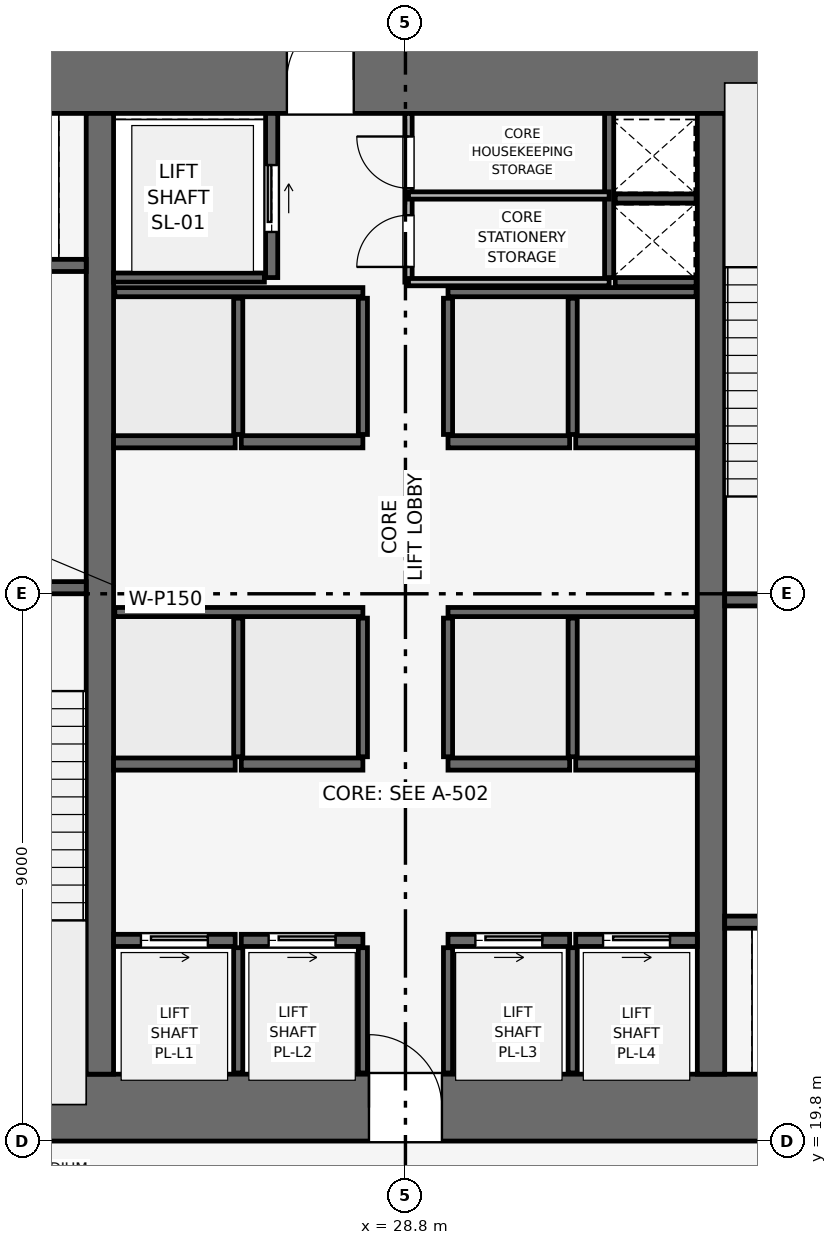
"""IFC4 building model, lengths in metres.
Left out: names, types, materials, properties, quantities, classifications, styles, units other than length and angle.
Written with IfcOpenShell. Run it as: python <this file> out.ifc"""

import sys

from ifc_helpers import new_model, si_unit, direction, frame, frame_2d, origin, place, context, subcontext, project, spatial, rectangle, extrude, element, fill, save


model = new_model("IFC4")
c1 = context("Model", 3, precision=1e-05, world=origin(), true_north=direction((0.0, 1.0)))
c2 = subcontext(c1, "Body", "Model", "MODEL_VIEW")
j1 = project(units=[si_unit("LENGTHUNIT", "METRE"), si_unit("PLANEANGLEUNIT", "RADIAN")], contexts=[c1])
p1 = place(None, origin())
s1 = spatial("IfcSite", under=j1, at=p1, CompositionType="ELEMENT")
p2 = place(p1, origin())
s2 = spatial("IfcBuilding", under=s1, at=p2, CompositionType="ELEMENT")
p3 = place(p2, frame((0.0, 0.0, 19.2)))
s3 = spatial("IfcBuildingStorey", under=s2, at=p3, CompositionType="ELEMENT", Elevation=19.2)
p4 = place(p3, frame((19.8, 20.35, 0.0), z_axis=(0.0, 0.0, 1.0), x_axis=(1.0, 0.0, 0.0)))
e1 = element("IfcWall", 1, at=p4, inside=s3, PredefinedType="SHEAR", context=c2, shape_type="SweptSolid", body=[
    extrude(rectangle(XDim=18.0, YDim=1.1, at=frame_2d((9.0, 0.0))), origin(), (0.0, 0.0, 1.0), 4.8),
])
p5 = place(p4, frame((8.4, 0.0, 0.0)))
e2 = element("IfcOpeningElement", 2, at=p5, cuts=e1, PredefinedType="OPENING", context=c2, shape_type="SweptSolid", body=[
    extrude(rectangle(XDim=1.2, YDim=2.2, at=frame_2d((0.6, 1.1))), frame((0.0, 0.56, 0.0), z_axis=(0.0, -1.0, 0.0), x_axis=(1.0, 0.0, 0.0)), (0.0, 0.0, 1.0), 1.12),
])
p6 = place(p3, frame((19.8, 37.25, 0.0), z_axis=(0.0, 0.0, 1.0), x_axis=(1.0, 0.0, 0.0)))
e3 = element("IfcWall", 3, at=p6, inside=s3, PredefinedType="SHEAR", context=c2, shape_type="SweptSolid", body=[
    extrude(rectangle(XDim=18.0, YDim=1.1, at=frame_2d((9.0, 0.0))), origin(), (0.0, 0.0, 1.0), 4.8),
])
p7 = place(p6, frame((7.05, 0.0, 0.0)))
e4 = element("IfcOpeningElement", 4, at=p7, cuts=e3, PredefinedType="OPENING", context=c2, shape_type="SweptSolid", body=[
    extrude(rectangle(XDim=1.1, YDim=2.15, at=frame_2d((0.55, 1.075))), frame((0.0, 0.56, 0.0), z_axis=(0.0, -1.0, 0.0), x_axis=(1.0, 0.0, 0.0)), (0.0, 0.0, 1.0), 1.12),
])
for number, where, z_axis, x_axis in (
    (5, (23.775, 20.9, 0.0), (0.0, 0.0, 1.0), (0.0, 1.0, 0.0)),
    (6, (33.825, 20.9, 0.0), (0.0, 0.0, 1.0), (0.0, 1.0, 0.0)),
):
    element("IfcWall", number, at=place(p3, frame(where, z_axis=z_axis, x_axis=x_axis)), inside=s3, PredefinedType="SHEAR", context=c2, shape_type="SweptSolid", body=[
        extrude(rectangle(XDim=15.8, YDim=0.45, at=frame_2d((7.9, 0.0))), origin(), (0.0, 0.0, 1.0), 4.8),
    ])
p8 = place(p3, frame((20.4, 28.9, 0.0), z_axis=(0.0, 0.0, 1.0), x_axis=(1.0, 0.0, 0.0)))
e7 = element("IfcWall", 7, at=p8, inside=s3, PredefinedType="SHEAR", context=c2, shape_type="SweptSolid", body=[
    extrude(rectangle(XDim=3.15, YDim=0.2, at=frame_2d((1.575, 0.0))), origin(), (0.0, 0.0, 1.0), 4.35),
])
p9 = place(p8, frame((0.8, 0.0, 0.0)))
e8 = element("IfcOpeningElement", 8, at=p9, cuts=e7, PredefinedType="OPENING", context=c2, shape_type="SweptSolid", body=[
    extrude(rectangle(XDim=1.0, YDim=2.1, at=frame_2d((0.5, 1.05))), frame((0.0, 0.11, 0.0), z_axis=(0.0, -1.0, 0.0), x_axis=(1.0, 0.0, 0.0)), (0.0, 0.0, 1.0), 0.22),
])
p10 = place(p3, frame((34.05, 28.7, 0.0), z_axis=(0.0, 0.0, 1.0), x_axis=(1.0, 0.0, 0.0)))
e9 = element("IfcWall", 9, at=p10, inside=s3, PredefinedType="SHEAR", context=c2, shape_type="SweptSolid", body=[
    extrude(rectangle(XDim=3.15, YDim=0.2, at=frame_2d((1.575, 0.0))), origin(), (0.0, 0.0, 1.0), 4.35),
])
p11 = place(p10, frame((0.8, 0.0, 0.0)))
e10 = element("IfcOpeningElement", 10, at=p11, cuts=e9, PredefinedType="OPENING", context=c2, shape_type="SweptSolid", body=[
    extrude(rectangle(XDim=1.0, YDim=2.1, at=frame_2d((0.5, 1.05))), frame((0.0, 0.11, 0.0), z_axis=(0.0, -1.0, 0.0), x_axis=(1.0, 0.0, 0.0)), (0.0, 0.0, 1.0), 0.22),
])
p12 = place(p3, frame((32.15, 34.0, 0.0), z_axis=(0.0, 0.0, 1.0), x_axis=(0.0, 1.0, 0.0)))
e11 = element("IfcWall", 11, at=p12, inside=s3, PredefinedType="SHEAR", context=c2, shape_type="SweptSolid", body=[
    extrude(rectangle(XDim=2.7, YDim=0.15, at=frame_2d((1.35, 0.0))), origin(), (0.0, 0.0, 1.0), 4.35),
])
for number, where, z_axis, x_axis in (
    (12, (32.25, 33.925, 0.0), (0.0, 0.0, 1.0), (1.0, 0.0, 0.0)),
    (13, (32.25, 35.3, 0.0), (0.0, 0.0, 1.0), (1.0, 0.0, 0.0)),
):
    element("IfcWall", number, at=place(p3, frame(where, z_axis=z_axis, x_axis=x_axis)), inside=s3, PredefinedType="SHEAR", context=c2, shape_type="SweptSolid", body=[
        extrude(rectangle(XDim=1.33, YDim=0.15, at=frame_2d((0.665, 0.0))), origin(), (0.0, 0.0, 1.0), 4.35),
    ])
p13 = place(p3, frame((20.5, 34.2, 0.0), z_axis=(0.0, 0.0, 1.0), x_axis=(1.0, 0.0, 0.0)))
e14 = element("IfcWall", 14, at=p13, inside=s3, PredefinedType="SHEAR", context=c2, shape_type="SweptSolid", body=[
    extrude(rectangle(XDim=3.05, YDim=0.2, at=frame_2d((1.525, 0.0))), origin(), (0.0, 0.0, 1.0), 4.35),
])
p14 = place(p13, frame((0.75, 0.0, 0.0)))
e15 = element("IfcOpeningElement", 15, at=p14, cuts=e14, PredefinedType="OPENING", context=c2, shape_type="SweptSolid", body=[
    extrude(rectangle(XDim=1.1, YDim=2.15, at=frame_2d((0.55, 1.075))), frame((0.0, 0.11, 0.0), z_axis=(0.0, -1.0, 0.0), x_axis=(1.0, 0.0, 0.0)), (0.0, 0.0, 1.0), 0.22),
])
p15 = place(p3, frame((34.05, 23.4, 0.0), z_axis=(0.0, 0.0, 1.0), x_axis=(1.0, 0.0, 0.0)))
e16 = element("IfcWall", 16, at=p15, inside=s3, PredefinedType="SHEAR", context=c2, shape_type="SweptSolid", body=[
    extrude(rectangle(XDim=3.05, YDim=0.2, at=frame_2d((1.525, 0.0))), origin(), (0.0, 0.0, 1.0), 4.35),
])
p16 = place(p15, frame((1.2, 0.0, 0.0)))
e17 = element("IfcOpeningElement", 17, at=p16, cuts=e16, PredefinedType="OPENING", context=c2, shape_type="SweptSolid", body=[
    extrude(rectangle(XDim=1.1, YDim=2.15, at=frame_2d((0.55, 1.075))), frame((0.0, 0.11, 0.0), z_axis=(0.0, -1.0, 0.0), x_axis=(1.0, 0.0, 0.0)), (0.0, 0.0, 1.0), 0.22),
])
p17 = place(p3, frame((26.6, 34.0, 0.0), z_axis=(0.0, 0.0, 1.0), x_axis=(0.0, 1.0, 0.0)))
e18 = element("IfcWall", 18, at=p17, inside=s3, PredefinedType="SHEAR", context=c2, shape_type="SweptSolid", body=[
    extrude(rectangle(XDim=2.7, YDim=0.2, at=frame_2d((1.35, 0.0))), origin(), (0.0, 0.0, 1.0), 4.35),
])
p18 = place(p17, frame((0.75, 0.0, 0.0)))
e19 = element("IfcOpeningElement", 19, at=p18, cuts=e18, PredefinedType="OPENING", context=c2, shape_type="SweptSolid", body=[
    extrude(rectangle(XDim=1.1, YDim=2.15, at=frame_2d((0.55, 1.075))), frame((0.0, 0.11, 0.0), z_axis=(0.0, -1.0, 0.0), x_axis=(1.0, 0.0, 0.0)), (0.0, 0.0, 1.0), 0.22),
])
p19 = place(p3, frame((24.0, 34.0, 0.0), z_axis=(0.0, 0.0, 1.0), x_axis=(1.0, 0.0, 0.0)))
e20 = element("IfcWall", 20, at=p19, inside=s3, PredefinedType="SHEAR", context=c2, shape_type="SweptSolid", body=[
    extrude(rectangle(XDim=2.48, YDim=0.15, at=frame_2d((1.24, 0.0))), origin(), (0.0, 0.0, 1.0), 4.35),
])
p20 = place(p3, frame((24.0, 23.1, 0.0), z_axis=(0.0, 0.0, 1.0), x_axis=(1.0, 0.0, 0.0)))
e21 = element("IfcWall", 21, at=p20, inside=s3, PredefinedType="SHEAR", context=c2, shape_type="SweptSolid", body=[
    extrude(rectangle(XDim=2.0, YDim=0.2, at=frame_2d((1.0, 0.0))), origin(), (0.0, 0.0, 1.0), 4.35),
])
p21 = place(p20, frame((0.45, 0.0, 0.0)))
e22 = element("IfcOpeningElement", 22, at=p21, cuts=e21, PredefinedType="OPENING", context=c2, shape_type="SweptSolid", body=[
    extrude(rectangle(XDim=1.1, YDim=2.15, at=frame_2d((0.55, 1.075))), frame((0.0, 0.11, 0.0), z_axis=(0.0, -1.0, 0.0), x_axis=(1.0, 0.0, 0.0)), (0.0, 0.0, 1.0), 0.22),
])
p22 = place(p3, frame((26.1, 23.1, 0.0), z_axis=(0.0, 0.0, 1.0), x_axis=(1.0, 0.0, 0.0)))
e23 = element("IfcWall", 23, at=p22, inside=s3, PredefinedType="SHEAR", context=c2, shape_type="SweptSolid", body=[
    extrude(rectangle(XDim=2.0, YDim=0.2, at=frame_2d((1.0, 0.0))), origin(), (0.0, 0.0, 1.0), 4.35),
])
p23 = place(p22, frame((0.45, 0.0, 0.0)))
e24 = element("IfcOpeningElement", 24, at=p23, cuts=e23, PredefinedType="OPENING", context=c2, shape_type="SweptSolid", body=[
    extrude(rectangle(XDim=1.1, YDim=2.15, at=frame_2d((0.55, 1.075))), frame((0.0, 0.11, 0.0), z_axis=(0.0, -1.0, 0.0), x_axis=(1.0, 0.0, 0.0)), (0.0, 0.0, 1.0), 0.22),
])
p24 = place(p3, frame((29.5, 23.1, 0.0), z_axis=(0.0, 0.0, 1.0), x_axis=(1.0, 0.0, 0.0)))
e25 = element("IfcWall", 25, at=p24, inside=s3, PredefinedType="SHEAR", context=c2, shape_type="SweptSolid", body=[
    extrude(rectangle(XDim=2.0, YDim=0.2, at=frame_2d((1.0, 0.0))), origin(), (0.0, 0.0, 1.0), 4.35),
])
p25 = place(p24, frame((0.45, 0.0, 0.0)))
e26 = element("IfcOpeningElement", 26, at=p25, cuts=e25, PredefinedType="OPENING", context=c2, shape_type="SweptSolid", body=[
    extrude(rectangle(XDim=1.1, YDim=2.15, at=frame_2d((0.55, 1.075))), frame((0.0, 0.11, 0.0), z_axis=(0.0, -1.0, 0.0), x_axis=(1.0, 0.0, 0.0)), (0.0, 0.0, 1.0), 0.22),
])
p26 = place(p3, frame((31.6, 23.1, 0.0), z_axis=(0.0, 0.0, 1.0), x_axis=(1.0, 0.0, 0.0)))
e27 = element("IfcWall", 27, at=p26, inside=s3, PredefinedType="SHEAR", context=c2, shape_type="SweptSolid", body=[
    extrude(rectangle(XDim=2.0, YDim=0.2, at=frame_2d((1.0, 0.0))), origin(), (0.0, 0.0, 1.0), 4.35),
])
p27 = place(p26, frame((0.45, 0.0, 0.0)))
e28 = element("IfcOpeningElement", 28, at=p27, cuts=e27, PredefinedType="OPENING", context=c2, shape_type="SweptSolid", body=[
    extrude(rectangle(XDim=1.1, YDim=2.15, at=frame_2d((0.55, 1.075))), frame((0.0, 0.11, 0.0), z_axis=(0.0, -1.0, 0.0), x_axis=(1.0, 0.0, 0.0)), (0.0, 0.0, 1.0), 0.22),
])
for number, where, z_axis, x_axis in (
    (29, (24.0, 26.0, 0.0), (0.0, 0.0, 1.0), (1.0, 0.0, 0.0)),
    (30, (26.1, 26.0, 0.0), (0.0, 0.0, 1.0), (1.0, 0.0, 0.0)),
    (31, (29.5, 26.0, 0.0), (0.0, 0.0, 1.0), (1.0, 0.0, 0.0)),
    (32, (31.6, 26.0, 0.0), (0.0, 0.0, 1.0), (1.0, 0.0, 0.0)),
    (33, (24.0, 31.3, 0.0), (0.0, 0.0, 1.0), (1.0, 0.0, 0.0)),
    (34, (26.1, 31.3, 0.0), (0.0, 0.0, 1.0), (1.0, 0.0, 0.0)),
    (35, (29.5, 31.3, 0.0), (0.0, 0.0, 1.0), (1.0, 0.0, 0.0)),
    (36, (31.6, 31.3, 0.0), (0.0, 0.0, 1.0), (1.0, 0.0, 0.0)),
):
    element("IfcWall", number, at=place(p3, frame(where, z_axis=z_axis, x_axis=x_axis)), inside=s3, PredefinedType="SHEAR", context=c2, shape_type="SweptSolid", body=[
        extrude(rectangle(XDim=2.0, YDim=0.2, at=frame_2d((1.0, 0.0))), origin(), (0.0, 0.0, 1.0), 4.35),
    ])
for number, where, z_axis, x_axis in (
    (37, (26.05, 20.92, 0.0), (0.0, 0.0, 1.0), (0.0, 1.0, 0.0)),
    (38, (28.1, 20.92, 0.0), (0.0, 0.0, 1.0), (0.0, 1.0, 0.0)),
    (39, (29.5, 20.92, 0.0), (0.0, 0.0, 1.0), (0.0, 1.0, 0.0)),
    (40, (31.55, 20.92, 0.0), (0.0, 0.0, 1.0), (0.0, 1.0, 0.0)),
):
    element("IfcWall", number, at=place(p3, frame(where, z_axis=z_axis, x_axis=x_axis)), inside=s3, PredefinedType="SHEAR", context=c2, shape_type="SweptSolid", body=[
        extrude(rectangle(XDim=2.06, YDim=0.15, at=frame_2d((1.03, 0.0))), origin(), (0.0, 0.0, 1.0), 4.35),
    ])
for number, where, z_axis, x_axis in (
    (41, (24.02, 28.5, 0.0), (0.0, 0.0, 1.0), (1.0, 0.0, 0.0)),
    (42, (29.5, 28.5, 0.0), (0.0, 0.0, 1.0), (1.0, 0.0, 0.0)),
):
    element("IfcWall", number, at=place(p3, frame(where, z_axis=z_axis, x_axis=x_axis)), inside=s3, PredefinedType="SHEAR", context=c2, shape_type="SweptSolid", body=[
        extrude(rectangle(XDim=4.08, YDim=0.15, at=frame_2d((2.04, 0.0))), origin(), (0.0, 0.0, 1.0), 4.35),
    ])
for number, where, z_axis, x_axis in (
    (43, (26.05, 26.12, 0.0), (0.0, 0.0, 1.0), (0.0, 1.0, 0.0)),
    (44, (28.1, 26.12, 0.0), (0.0, 0.0, 1.0), (0.0, 1.0, 0.0)),
    (45, (29.5, 26.12, 0.0), (0.0, 0.0, 1.0), (0.0, 1.0, 0.0)),
    (46, (31.55, 26.12, 0.0), (0.0, 0.0, 1.0), (0.0, 1.0, 0.0)),
):
    element("IfcWall", number, at=place(p3, frame(where, z_axis=z_axis, x_axis=x_axis)), inside=s3, PredefinedType="SHEAR", context=c2, shape_type="SweptSolid", body=[
        extrude(rectangle(XDim=2.28, YDim=0.15, at=frame_2d((1.14, 0.0))), origin(), (0.0, 0.0, 1.0), 4.35),
    ])
for number, where, z_axis, x_axis in (
    (47, (24.02, 33.76, 0.0), (0.0, 0.0, 1.0), (1.0, 0.0, 0.0)),
    (48, (29.5, 33.76, 0.0), (0.0, 0.0, 1.0), (1.0, 0.0, 0.0)),
):
    element("IfcWall", number, at=place(p3, frame(where, z_axis=z_axis, x_axis=x_axis)), inside=s3, PredefinedType="SHEAR", context=c2, shape_type="SweptSolid", body=[
        extrude(rectangle(XDim=4.08, YDim=0.15, at=frame_2d((2.04, 0.0))), origin(), (0.0, 0.0, 1.0), 4.35),
    ])
for number, where, z_axis, x_axis in (
    (49, (26.05, 31.42, 0.0), (0.0, 0.0, 1.0), (0.0, 1.0, 0.0)),
    (50, (28.1, 31.42, 0.0), (0.0, 0.0, 1.0), (0.0, 1.0, 0.0)),
    (51, (29.5, 31.42, 0.0), (0.0, 0.0, 1.0), (0.0, 1.0, 0.0)),
    (52, (31.55, 31.42, 0.0), (0.0, 0.0, 1.0), (0.0, 1.0, 0.0)),
):
    element("IfcWall", number, at=place(p3, frame(where, z_axis=z_axis, x_axis=x_axis)), inside=s3, PredefinedType="SHEAR", context=c2, shape_type="SweptSolid", body=[
        extrude(rectangle(XDim=2.24, YDim=0.15, at=frame_2d((1.12, 0.0))), origin(), (0.0, 0.0, 1.0), 4.35),
    ])
p28 = place(p3, frame((28.85, 33.925, 0.0), z_axis=(0.0, 0.0, 1.0), x_axis=(0.0, 1.0, 0.0)))
e53 = element("IfcWall", 53, at=p28, inside=s3, PredefinedType="PARTITIONING", context=c2, shape_type="SweptSolid", body=[
    extrude(rectangle(XDim=2.775, YDim=0.12, at=frame_2d((1.387, 0.0))), origin(), (0.0, 0.0, 1.0), 4.35),
])
p29 = place(p28, frame((0.25, 0.0, 0.0)))
e54 = element("IfcOpeningElement", 54, at=p29, cuts=e53, PredefinedType="OPENING", context=c2, shape_type="SweptSolid", body=[
    extrude(rectangle(XDim=0.85, YDim=2.1, at=frame_2d((0.425, 1.05))), frame((0.0, 0.07, 0.0), z_axis=(0.0, -1.0, 0.0), x_axis=(1.0, 0.0, 0.0)), (0.0, 0.0, 1.0), 0.14),
])
p30 = place(p28, frame((1.545, 0.0, 0.0)))
e55 = element("IfcOpeningElement", 55, at=p30, cuts=e53, PredefinedType="OPENING", context=c2, shape_type="SweptSolid", body=[
    extrude(rectangle(XDim=0.85, YDim=2.1, at=frame_2d((0.425, 1.05))), frame((0.0, 0.07, 0.0), z_axis=(0.0, -1.0, 0.0), x_axis=(1.0, 0.0, 0.0)), (0.0, 0.0, 1.0), 0.14),
])
for number, where, z_axis, x_axis in (
    (56, (28.85, 35.35, 0.0), (0.0, 0.0, 1.0), (1.0, 0.0, 0.0)),
    (57, (28.85, 33.925, 0.0), (0.0, 0.0, 1.0), (1.0, 0.0, 0.0)),
):
    element("IfcWall", number, at=place(p3, frame(where, z_axis=z_axis, x_axis=x_axis)), inside=s3, PredefinedType="PARTITIONING", context=c2, shape_type="SweptSolid", body=[
        extrude(rectangle(XDim=3.3, YDim=0.12, at=frame_2d((1.65, 0.0))), origin(), (0.0, 0.0, 1.0), 4.35),
    ])
p31 = place(p18, origin())
e58 = element("IfcDoor", 58, at=p31, inside=s3, OperationType="SLIDING_TO_RIGHT", PredefinedType="DOOR", context=c2, shape_type="SweptSolid", body=[
    extrude(rectangle(XDim=1.1, YDim=2.15, at=frame_2d((0.55, 1.075))), frame((0.0, 0.025, 0.0), z_axis=(0.0, -1.0, 0.0), x_axis=(1.0, 0.0, 0.0)), (0.0, 0.0, 1.0), 0.05),
])
fill(e19, e58)
p32 = place(p21, origin())
e59 = element("IfcDoor", 59, at=p32, inside=s3, OperationType="SLIDING_TO_RIGHT", PredefinedType="DOOR", context=c2, shape_type="SweptSolid", body=[
    extrude(rectangle(XDim=1.1, YDim=2.15, at=frame_2d((0.55, 1.075))), frame((0.0, 0.025, 0.0), z_axis=(0.0, -1.0, 0.0), x_axis=(1.0, 0.0, 0.0)), (0.0, 0.0, 1.0), 0.05),
])
fill(e22, e59)
p33 = place(p23, origin())
e60 = element("IfcDoor", 60, at=p33, inside=s3, OperationType="SLIDING_TO_RIGHT", PredefinedType="DOOR", context=c2, shape_type="SweptSolid", body=[
    extrude(rectangle(XDim=1.1, YDim=2.15, at=frame_2d((0.55, 1.075))), frame((0.0, 0.025, 0.0), z_axis=(0.0, -1.0, 0.0), x_axis=(1.0, 0.0, 0.0)), (0.0, 0.0, 1.0), 0.05),
])
fill(e24, e60)
p34 = place(p25, origin())
e61 = element("IfcDoor", 61, at=p34, inside=s3, OperationType="SLIDING_TO_RIGHT", PredefinedType="DOOR", context=c2, shape_type="SweptSolid", body=[
    extrude(rectangle(XDim=1.1, YDim=2.15, at=frame_2d((0.55, 1.075))), frame((0.0, 0.025, 0.0), z_axis=(0.0, -1.0, 0.0), x_axis=(1.0, 0.0, 0.0)), (0.0, 0.0, 1.0), 0.05),
])
fill(e26, e61)
p35 = place(p27, origin())
e62 = element("IfcDoor", 62, at=p35, inside=s3, OperationType="SLIDING_TO_RIGHT", PredefinedType="DOOR", context=c2, shape_type="SweptSolid", body=[
    extrude(rectangle(XDim=1.1, YDim=2.15, at=frame_2d((0.55, 1.075))), frame((0.0, 0.025, 0.0), z_axis=(0.0, -1.0, 0.0), x_axis=(1.0, 0.0, 0.0)), (0.0, 0.0, 1.0), 0.05),
])
fill(e28, e62)
p36 = place(p29, origin())
e63 = element("IfcDoor", 63, at=p36, inside=s3, OperationType="SINGLE_SWING_LEFT", PredefinedType="DOOR", context=c2, shape_type="SweptSolid", body=[
    extrude(rectangle(XDim=0.85, YDim=2.1, at=frame_2d((0.425, 1.05))), frame((0.0, 0.025, 0.0), z_axis=(0.0, -1.0, 0.0), x_axis=(1.0, 0.0, 0.0)), (0.0, 0.0, 1.0), 0.05),
])
fill(e54, e63)
p37 = place(p30, origin())
e64 = element("IfcDoor", 64, at=p37, inside=s3, OperationType="SINGLE_SWING_RIGHT", PredefinedType="DOOR", context=c2, shape_type="SweptSolid", body=[
    extrude(rectangle(XDim=0.85, YDim=2.1, at=frame_2d((0.425, 1.05))), frame((0.0, 0.025, 0.0), z_axis=(0.0, -1.0, 0.0), x_axis=(1.0, 0.0, 0.0)), (0.0, 0.0, 1.0), 0.05),
])
fill(e55, e64)
p38 = place(p5, origin())
e65 = element("IfcDoor", 65, at=p38, inside=s3, OperationType="SINGLE_SWING_LEFT", PredefinedType="DOOR", context=c2, shape_type="SweptSolid", body=[
    extrude(rectangle(XDim=1.2, YDim=2.2, at=frame_2d((0.6, 1.1))), frame((0.0, 0.025, 0.0), z_axis=(0.0, -1.0, 0.0), x_axis=(1.0, 0.0, 0.0)), (0.0, 0.0, 1.0), 0.05),
])
fill(e2, e65)
p39 = place(p7, origin())
e66 = element("IfcDoor", 66, at=p39, inside=s3, OperationType="SINGLE_SWING_RIGHT", PredefinedType="DOOR", context=c2, shape_type="SweptSolid", body=[
    extrude(rectangle(XDim=1.1, YDim=2.15, at=frame_2d((0.55, 1.075))), frame((0.0, 0.025, 0.0), z_axis=(0.0, -1.0, 0.0), x_axis=(1.0, 0.0, 0.0)), (0.0, 0.0, 1.0), 0.05),
])
fill(e4, e66)
save(model, sys.argv[1])
